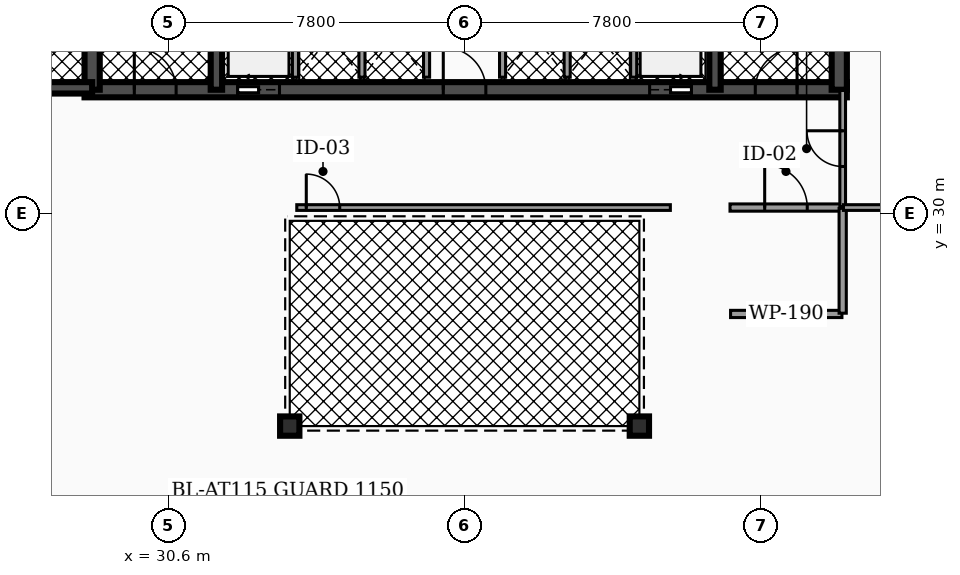
"""IFC4 building model, lengths in metres.
Left out: names, types, materials, properties, quantities, classifications, styles, units other than length and angle.
Written with IfcOpenShell. Run it as: python <this file> out.ifc"""

import sys

from ifc_helpers import new_model, si_unit, direction, frame, frame_2d, origin, origin_2d, place, context, subcontext, project, spatial, rectangle, hollow_circle, extrude, element, fill, save


model = new_model("IFC4")
c1 = context("Model", 3, precision=1e-05, world=origin(), true_north=direction((0.0, 1.0)))
c2 = subcontext(c1, "Body", "Model", "MODEL_VIEW")
j1 = project(units=[si_unit("LENGTHUNIT", "METRE"), si_unit("PLANEANGLEUNIT", "RADIAN")], contexts=[c1])
p1 = place(None, origin())
s1 = spatial("IfcSite", under=j1, at=p1, CompositionType="ELEMENT")
p2 = place(p1, origin())
s2 = spatial("IfcBuilding", under=s1, at=p2, CompositionType="ELEMENT")
p3 = place(p2, frame((0.0, 0.0, 39.78)))
s3 = spatial("IfcBuildingStorey", under=s2, at=p3, CompositionType="ELEMENT", Elevation=39.78)
p4 = place(p3, frame((28.4, 33.25, 0.0), z_axis=(0.0, 0.0, 1.0), x_axis=(1.0, 0.0, 0.0)))
e1 = element("IfcWall", 1, at=p4, inside=s3, PredefinedType="SHEAR", context=c2, shape_type="SweptSolid", body=[
    extrude(rectangle(XDim=20.06, YDim=0.4, at=frame_2d((10.03, 0.0))), origin(), (0.0, 0.0, 1.0), 3.82),
])
p5 = place(p4, frame((4.03, 0.0, 0.0)))
e2 = element("IfcOpeningElement", 2, at=p5, cuts=e1, PredefinedType="OPENING", context=c2, shape_type="SweptSolid", body=[
    extrude(rectangle(XDim=1.1, YDim=2.15, at=frame_2d((0.55, 1.075))), frame((0.0, 0.21, 0.0), z_axis=(0.0, -1.0, 0.0), x_axis=(1.0, 0.0, 0.0)), (0.0, 0.0, 1.0), 0.42),
])
p6 = place(p4, frame((14.87, 0.0, 0.0)))
e3 = element("IfcOpeningElement", 3, at=p6, cuts=e1, PredefinedType="OPENING", context=c2, shape_type="SweptSolid", body=[
    extrude(rectangle(XDim=1.1, YDim=2.15, at=frame_2d((0.55, 1.075))), frame((0.0, 0.21, 0.0), z_axis=(0.0, -1.0, 0.0), x_axis=(1.0, 0.0, 0.0)), (0.0, 0.0, 1.0), 0.42),
])
p7 = place(p4, frame((1.31, 0.0, 0.0)))
e4 = element("IfcOpeningElement", 4, at=p7, cuts=e1, PredefinedType="OPENING", context=c2, shape_type="SweptSolid", body=[
    extrude(rectangle(XDim=1.1, YDim=2.2, at=frame_2d((0.55, 1.1))), frame((0.0, 0.21, 0.0), z_axis=(0.0, -1.0, 0.0), x_axis=(1.0, 0.0, 0.0)), (0.0, 0.0, 1.0), 0.42),
])
p8 = place(p4, frame((9.44, 0.0, 0.0)))
e5 = element("IfcOpeningElement", 5, at=p8, cuts=e1, PredefinedType="OPENING", context=c2, shape_type="SweptSolid", body=[
    extrude(rectangle(XDim=1.12, YDim=2.05, at=frame_2d((0.56, 1.025))), frame((0.0, 0.21, 0.0), z_axis=(0.0, -1.0, 0.0), x_axis=(1.0, 0.0, 0.0)), (0.0, 0.0, 1.0), 0.42),
])
p9 = place(p4, frame((17.65, 0.0, 0.0)))
e6 = element("IfcOpeningElement", 6, at=p9, cuts=e1, PredefinedType="OPENING", context=c2, shape_type="SweptSolid", body=[
    extrude(rectangle(XDim=1.1, YDim=2.2, at=frame_2d((0.55, 1.1))), frame((0.0, 0.21, 0.0), z_axis=(0.0, -1.0, 0.0), x_axis=(1.0, 0.0, 0.0)), (0.0, 0.0, 1.0), 0.42),
])
p10 = place(p3, frame((28.6, 33.25, 0.0), z_axis=(0.0, 0.0, 1.0), x_axis=(0.0, 1.0, 0.0)))
e7 = element("IfcWall", 7, at=p10, inside=s3, PredefinedType="SHEAR", context=c2, shape_type="SweptSolid", body=[
    extrude(rectangle(XDim=10.2, YDim=0.4, at=frame_2d((5.1, 0.0))), origin(), (0.0, 0.0, 1.0), 3.82),
])
for number, where, z_axis, x_axis in (
    (8, (31.87, 33.25, 0.0), (0.0, 0.0, 1.0), (0.0, 1.0, 0.0)),
    (9, (44.99, 33.25, 0.0), (0.0, 0.0, 1.0), (0.0, 1.0, 0.0)),
):
    element("IfcWall", number, at=place(p3, frame(where, z_axis=z_axis, x_axis=x_axis)), inside=s3, PredefinedType="SHEAR", context=c2, shape_type="SweptSolid", body=[
        extrude(rectangle(XDim=10.2, YDim=0.3, at=frame_2d((5.1, 0.0))), origin(), (0.0, 0.0, 1.0), 3.82),
    ])
p11 = place(p3, frame((48.26, 33.25, 0.0), z_axis=(0.0, 0.0, 1.0), x_axis=(0.0, 1.0, 0.0)))
e10 = element("IfcWall", 10, at=p11, inside=s3, PredefinedType="SHEAR", context=c2, shape_type="SweptSolid", body=[
    extrude(rectangle(XDim=10.2, YDim=0.4, at=frame_2d((5.1, 0.0))), origin(), (0.0, 0.0, 1.0), 3.82),
])
p12 = place(p3, frame((25.08, 33.3, 0.0), z_axis=(0.0, 0.0, 1.0), x_axis=(1.0, 0.0, 0.0)))
e11 = element("IfcWall", 11, at=p12, inside=s3, PredefinedType="SHEAR", context=c2, shape_type="SweptSolid", body=[
    extrude(rectangle(XDim=3.52, YDim=0.3, at=frame_2d((1.76, 0.0))), origin(), (0.0, 0.0, 1.0), 3.82),
])
p13 = place(p12, frame((1.335, 0.0, 0.0)))
e12 = element("IfcOpeningElement", 12, at=p13, cuts=e11, PredefinedType="OPENING", context=c2, shape_type="SweptSolid", body=[
    extrude(rectangle(XDim=0.95, YDim=2.2, at=frame_2d((0.475, 1.1))), frame((0.0, 0.16, 0.0), z_axis=(0.0, -1.0, 0.0), x_axis=(1.0, 0.0, 0.0)), (0.0, 0.0, 1.0), 0.32),
])
for number, where, z_axis, x_axis in (
    (13, (33.8, 24.4, 0.0), (0.0, 0.0, 1.0), (1.0, 0.0, 0.0)),
    (14, (43.0, 24.4, 0.0), (0.0, 0.0, 1.0), (1.0, 0.0, 0.0)),
):
    element("IfcColumn", number, at=place(p3, frame(where, z_axis=z_axis, x_axis=x_axis)), inside=s3, PredefinedType="COLUMN", context=c2, shape_type="SweptSolid", body=[
        extrude(hollow_circle(Radius=0.254, WallThickness=0.02, at=origin_2d()), origin(), (0.0, 0.0, 1.0), 3.82),
    ])
for number, where, z_axis, x_axis in (
    (15, (33.95, 33.58, 0.0), (0.0, 0.0, 1.0), (0.0, 1.0, 0.0)),
    (16, (42.85, 33.58, 0.0), (0.0, 0.0, 1.0), (0.0, 1.0, 0.0)),
):
    element("IfcWall", number, at=place(p3, frame(where, z_axis=z_axis, x_axis=x_axis)), inside=s3, PredefinedType="SOLIDWALL", context=c2, shape_type="SweptSolid", body=[
        extrude(rectangle(XDim=2.45, YDim=0.16, at=frame_2d((1.225, 0.0))), origin(), (0.0, 0.0, 1.0), 2.792),
    ])
for number, where, z_axis, x_axis in (
    (17, (35.7, 33.58, 0.0), (0.0, 0.0, 1.0), (0.0, 1.0, 0.0)),
    (18, (37.4, 33.58, 0.0), (0.0, 0.0, 1.0), (0.0, 1.0, 0.0)),
    (19, (39.4, 33.58, 0.0), (0.0, 0.0, 1.0), (0.0, 1.0, 0.0)),
    (20, (41.1, 33.58, 0.0), (0.0, 0.0, 1.0), (0.0, 1.0, 0.0)),
):
    element("IfcWall", number, at=place(p3, frame(where, z_axis=z_axis, x_axis=x_axis)), inside=s3, PredefinedType="SOLIDWALL", context=c2, shape_type="SweptSolid", body=[
        extrude(rectangle(XDim=2.25, YDim=0.16, at=frame_2d((1.125, 0.0))), origin(), (0.0, 0.0, 1.0), 2.792),
    ])
p14 = place(p3, frame((45.385, 30.15, 0.0), z_axis=(0.0, 0.0, 1.0), x_axis=(1.0, 0.0, 0.0)))
e21 = element("IfcWall", 21, at=p14, inside=s3, PredefinedType="PARTITIONING", context=c2, shape_type="SweptSolid", body=[
    extrude(rectangle(XDim=2.945, YDim=0.19, at=frame_2d((1.473, 0.0))), origin(), (0.0, 0.0, 1.0), 2.777),
])
p15 = place(p14, frame((0.913, 0.0, 0.0)))
e22 = element("IfcOpeningElement", 22, at=p15, cuts=e21, PredefinedType="OPENING", context=c2, shape_type="SweptSolid", body=[
    extrude(rectangle(XDim=1.12, YDim=2.05, at=frame_2d((0.56, 1.025))), frame((0.0, 0.105, 0.0), z_axis=(0.0, -1.0, 0.0), x_axis=(1.0, 0.0, 0.0)), (0.0, 0.0, 1.0), 0.21),
])
p16 = place(p3, frame((48.35, 30.17, 0.0), z_axis=(0.0, 0.0, 1.0), x_axis=(0.0, 1.0, 0.0)))
e23 = element("IfcWall", 23, at=p16, inside=s3, PredefinedType="PARTITIONING", context=c2, shape_type="SweptSolid", body=[
    extrude(rectangle(XDim=3.06, YDim=0.15, at=frame_2d((1.53, 0.0))), origin(), (0.0, 0.0, 1.0), 2.777),
])
p17 = place(p16, frame((1.06, 0.0, 0.0)))
e24 = element("IfcOpeningElement", 24, at=p17, cuts=e23, PredefinedType="OPENING", context=c2, shape_type="SweptSolid", body=[
    extrude(rectangle(XDim=0.94, YDim=2.05, at=frame_2d((0.47, 1.025))), frame((0.0, 0.085, 0.0), z_axis=(0.0, -1.0, 0.0), x_axis=(1.0, 0.0, 0.0)), (0.0, 0.0, 1.0), 0.17),
])
p18 = place(p3, frame((33.985, 30.15, 0.0), z_axis=(0.0, 0.0, 1.0), x_axis=(1.0, 0.0, 0.0)))
e25 = element("IfcWall", 25, at=p18, inside=s3, PredefinedType="PARTITIONING", context=c2, shape_type="SweptSolid", body=[
    extrude(rectangle(XDim=9.83, YDim=0.15, at=frame_2d((4.915, 0.0))), origin(), (0.0, 0.0, 1.0), 2.777),
])
p19 = place(p18, frame((0.25, 0.0, 0.0)))
e26 = element("IfcOpeningElement", 26, at=p19, cuts=e25, PredefinedType="OPENING", context=c2, shape_type="SweptSolid", body=[
    extrude(rectangle(XDim=0.88, YDim=2.05, at=frame_2d((0.44, 1.025))), frame((0.0, 0.085, 0.0), z_axis=(0.0, -1.0, 0.0), x_axis=(1.0, 0.0, 0.0)), (0.0, 0.0, 1.0), 0.17),
])
p20 = place(p3, frame((45.4, 27.35, 0.0), z_axis=(0.0, 0.0, 1.0), x_axis=(1.0, 0.0, 0.0)))
e27 = element("IfcWall", 27, at=p20, inside=s3, PredefinedType="PARTITIONING", context=c2, shape_type="SweptSolid", body=[
    extrude(rectangle(XDim=2.93, YDim=0.19, at=frame_2d((1.465, 0.0))), origin(), (0.0, 0.0, 1.0), 2.777),
])
p21 = place(p3, frame((48.35, 27.37, 0.0), z_axis=(0.0, 0.0, 1.0), x_axis=(0.0, 1.0, 0.0)))
e28 = element("IfcWall", 28, at=p21, inside=s3, PredefinedType="PARTITIONING", context=c2, shape_type="SweptSolid", body=[
    extrude(rectangle(XDim=2.76, YDim=0.19, at=frame_2d((1.38, 0.0))), origin(), (0.0, 0.0, 1.0), 2.777),
])
p22 = place(p3, frame((48.37, 30.15, 0.0), z_axis=(0.0, 0.0, 1.0), x_axis=(1.0, 0.0, 0.0)))
e29 = element("IfcWall", 29, at=p22, inside=s3, PredefinedType="PARTITIONING", context=c2, shape_type="SweptSolid", body=[
    extrude(rectangle(XDim=2.06, YDim=0.15, at=frame_2d((1.03, 0.0))), origin(), (0.0, 0.0, 1.0), 2.777),
])
p23 = place(p5, origin())
e30 = element("IfcDoor", 30, at=p23, inside=s3, OperationType="SLIDING_TO_LEFT", PredefinedType="DOOR", context=c2, shape_type="SweptSolid", body=[
    extrude(rectangle(XDim=1.1, YDim=2.15, at=frame_2d((0.55, 1.075))), frame((0.0, 0.025, 0.0), z_axis=(0.0, -1.0, 0.0), x_axis=(1.0, 0.0, 0.0)), (0.0, 0.0, 1.0), 0.05),
])
fill(e2, e30)
p24 = place(p6, origin())
e31 = element("IfcDoor", 31, at=p24, inside=s3, OperationType="SLIDING_TO_RIGHT", PredefinedType="DOOR", context=c2, shape_type="SweptSolid", body=[
    extrude(rectangle(XDim=1.1, YDim=2.15, at=frame_2d((0.55, 1.075))), frame((0.0, 0.025, 0.0), z_axis=(0.0, -1.0, 0.0), x_axis=(1.0, 0.0, 0.0)), (0.0, 0.0, 1.0), 0.05),
])
fill(e3, e31)
p25 = place(p7, origin())
e32 = element("IfcDoor", 32, at=p25, inside=s3, OperationType="SINGLE_SWING_LEFT", PredefinedType="DOOR", context=c2, shape_type="SweptSolid", body=[
    extrude(rectangle(XDim=1.1, YDim=2.2, at=frame_2d((0.55, 1.1))), frame((0.0, 0.025, 0.0), z_axis=(0.0, -1.0, 0.0), x_axis=(1.0, 0.0, 0.0)), (0.0, 0.0, 1.0), 0.05),
])
fill(e4, e32)
p26 = place(p8, origin())
e33 = element("IfcDoor", 33, at=p26, inside=s3, OperationType="SINGLE_SWING_LEFT", PredefinedType="DOOR", context=c2, shape_type="SweptSolid", body=[
    extrude(rectangle(XDim=1.12, YDim=2.05, at=frame_2d((0.56, 1.025))), frame((0.0, 0.025, 0.0), z_axis=(0.0, -1.0, 0.0), x_axis=(1.0, 0.0, 0.0)), (0.0, 0.0, 1.0), 0.05),
])
fill(e5, e33)
p27 = place(p9, origin())
e34 = element("IfcDoor", 34, at=p27, inside=s3, OperationType="SINGLE_SWING_RIGHT", PredefinedType="DOOR", context=c2, shape_type="SweptSolid", body=[
    extrude(rectangle(XDim=1.1, YDim=2.2, at=frame_2d((0.55, 1.1))), frame((0.0, 0.025, 0.0), z_axis=(0.0, -1.0, 0.0), x_axis=(1.0, 0.0, 0.0)), (0.0, 0.0, 1.0), 0.05),
])
fill(e6, e34)
p28 = place(p15, origin())
e35 = element("IfcDoor", 35, at=p28, inside=s3, OperationType="SINGLE_SWING_LEFT", PredefinedType="DOOR", context=c2, shape_type="SweptSolid", body=[
    extrude(rectangle(XDim=1.12, YDim=2.05, at=frame_2d((0.56, 1.025))), frame((0.0, 0.025, 0.0), z_axis=(0.0, -1.0, 0.0), x_axis=(1.0, 0.0, 0.0)), (0.0, 0.0, 1.0), 0.05),
])
fill(e22, e35)
p29 = place(p17, origin())
e36 = element("IfcDoor", 36, at=p29, inside=s3, OperationType="SINGLE_SWING_RIGHT", PredefinedType="DOOR", context=c2, shape_type="SweptSolid", body=[
    extrude(rectangle(XDim=0.94, YDim=2.05, at=frame_2d((0.47, 1.025))), frame((0.0, 0.025, 0.0), z_axis=(0.0, -1.0, 0.0), x_axis=(1.0, 0.0, 0.0)), (0.0, 0.0, 1.0), 0.05),
])
fill(e24, e36)
p30 = place(p19, origin())
e37 = element("IfcDoor", 37, at=p30, inside=s3, OperationType="SINGLE_SWING_LEFT", PredefinedType="DOOR", context=c2, shape_type="SweptSolid", body=[
    extrude(rectangle(XDim=0.88, YDim=2.05, at=frame_2d((0.44, 1.025))), frame((0.0, 0.025, 0.0), z_axis=(0.0, -1.0, 0.0), x_axis=(1.0, 0.0, 0.0)), (0.0, 0.0, 1.0), 0.05),
])
fill(e26, e37)
save(model, sys.argv[1])
